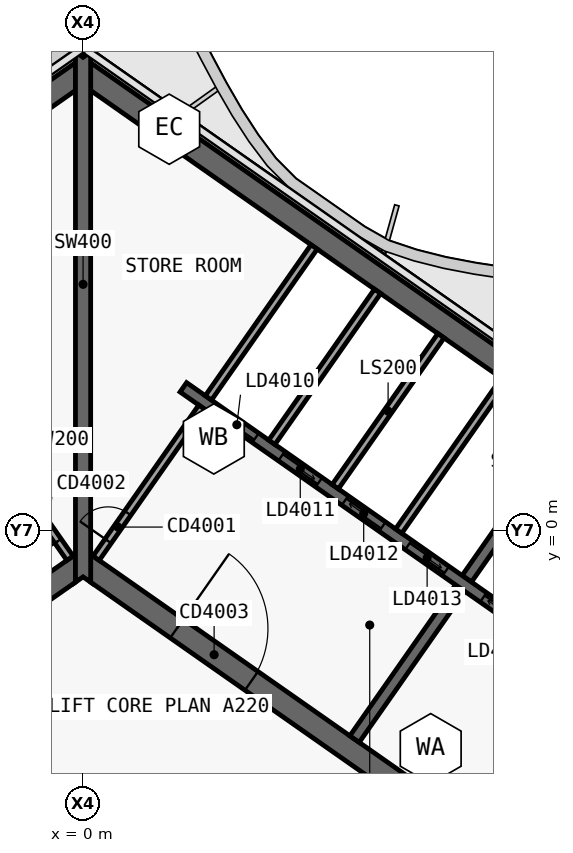
"""IFC4 building model, lengths in metres.
Left out: names, types, materials, properties, quantities, classifications, styles, units other than length and angle.
Written with IfcOpenShell. Run it as: python <this file> out.ifc"""

import sys

from ifc_helpers import new_model, si_unit, direction, frame, frame_2d, origin, place, context, subcontext, project, spatial, polyline, rectangle, outline, extrude, element, fill, save


model = new_model("IFC4")
c1 = context("Model", 3, precision=1e-05, world=origin(), true_north=direction((0.0, 1.0)))
c2 = subcontext(c1, "Body", "Model", "MODEL_VIEW")
j1 = project(units=[si_unit("LENGTHUNIT", "METRE"), si_unit("PLANEANGLEUNIT", "RADIAN")], contexts=[c1])
p1 = place(None, origin())
s1 = spatial("IfcSite", under=j1, at=p1, CompositionType="ELEMENT")
p2 = place(p1, origin())
s2 = spatial("IfcBuilding", under=s1, at=p2, CompositionType="ELEMENT")
p3 = place(p2, frame((0.0, 0.0, 219.4)))
s3 = spatial("IfcBuildingStorey", under=s2, at=p3, CompositionType="ELEMENT", Elevation=219.4)
p4 = place(p3, frame((-0.028, 12.066, 0.0), z_axis=(0.0, 0.0, 1.0), x_axis=(-0.819151382952, -0.573577380837, 0.0)))
e1 = element("IfcWall", 1, at=p4, inside=s3, PredefinedType="SHEAR", context=c2, shape_type="SweptSolid", body=[
    extrude(outline(polyline([(33.898, 0.3), (0.42, 0.3), (0.0, -0.3), (33.898, -0.3), (33.898, 0.3)])), origin(), (0.0, 0.0, 1.0), 6.0),
])
p5 = place(p3, frame((-0.028, -0.874, 0.0), z_axis=(0.0, 0.0, 1.0), x_axis=(-0.819150035022, -0.573579305871, 0.0)))
e2 = element("IfcWall", 2, at=p5, inside=s3, PredefinedType="SHEAR", context=c2, shape_type="SweptSolid", body=[
    extrude(outline(polyline([(26.476, 0.3), (0.42, 0.3), (0.0, -0.3), (26.476, -0.3), (26.476, 0.3)])), origin(), (0.0, 0.0, 1.0), 6.0),
])
p6 = place(p5, frame((2.976, 0.0, 0.0)))
e3 = element("IfcOpeningElement", 3, at=p6, cuts=e2, PredefinedType="OPENING", context=c2, shape_type="SweptSolid", body=[
    extrude(rectangle(XDim=2.4, YDim=2.1, at=frame_2d((1.2, 1.05))), frame((0.0, 0.31, 0.0), z_axis=(0.0, -1.0, 0.0), x_axis=(1.0, 0.0, 0.0)), (0.0, 0.0, 1.0), 0.62),
])
p7 = place(p5, frame((11.776, 0.0, 0.0)))
e4 = element("IfcOpeningElement", 4, at=p7, cuts=e2, PredefinedType="OPENING", context=c2, shape_type="SweptSolid", body=[
    extrude(rectangle(XDim=2.4, YDim=2.1, at=frame_2d((1.2, 1.05))), frame((0.0, 0.31, 0.0), z_axis=(0.0, -1.0, 0.0), x_axis=(1.0, 0.0, 0.0)), (0.0, 0.0, 1.0), 0.62),
])
p8 = place(p3, frame((0.028, 12.066, 0.0), z_axis=(0.0, 0.0, 1.0), x_axis=(0.819151382952, -0.573577380837, 0.0)))
e5 = element("IfcWall", 5, at=p8, inside=s3, PredefinedType="SHEAR", context=c2, shape_type="SweptSolid", body=[
    extrude(outline(polyline([(33.898, 0.3), (0.0, 0.3), (0.42, -0.3), (33.898, -0.3), (33.898, 0.3)])), origin(), (0.0, 0.0, 1.0), 6.0),
])
p9 = place(p3, frame((0.028, -0.874, 0.0), z_axis=(0.0, 0.0, 1.0), x_axis=(0.819150035022, -0.573579305871, 0.0)))
e6 = element("IfcWall", 6, at=p9, inside=s3, PredefinedType="SHEAR", context=c2, shape_type="SweptSolid", body=[
    extrude(outline(polyline([(26.476, 0.3), (0.0, 0.3), (0.42, -0.3), (26.476, -0.3), (26.476, 0.3)])), origin(), (0.0, 0.0, 1.0), 6.0),
])
p10 = place(p9, frame((2.976, 0.0, 0.0)))
e7 = element("IfcOpeningElement", 7, at=p10, cuts=e6, PredefinedType="OPENING", context=c2, shape_type="SweptSolid", body=[
    extrude(rectangle(XDim=2.4, YDim=2.1, at=frame_2d((1.2, 1.05))), frame((0.0, 0.31, 0.0), z_axis=(0.0, -1.0, 0.0), x_axis=(1.0, 0.0, 0.0)), (0.0, 0.0, 1.0), 0.62),
])
p11 = place(p9, frame((12.226, 0.0, 0.0)))
e8 = element("IfcOpeningElement", 8, at=p11, cuts=e6, PredefinedType="OPENING", context=c2, shape_type="SweptSolid", body=[
    extrude(rectangle(XDim=1.5, YDim=2.1, at=frame_2d((0.75, 1.05))), frame((0.0, 0.31, 0.0), z_axis=(0.0, -1.0, 0.0), x_axis=(1.0, 0.0, 0.0)), (0.0, 0.0, 1.0), 0.62),
])
p12 = place(p3, frame((7.143, -5.49, 0.0), z_axis=(0.0, 0.0, 1.0), x_axis=(0.573617744349, 0.819123118565, 0.0)))
e9 = element("IfcWall", 9, at=p12, inside=s3, PredefinedType="SHEAR", context=c2, shape_type="SweptSolid", body=[
    extrude(outline(polyline([(0.0, 0.15), (0.0, -0.15), (4.85, -0.15), (4.85, 0.15), (0.0, 0.15)])), origin(), (0.0, 0.0, 1.0), 6.0),
])
p13 = place(p3, frame((10.097, -1.271, 0.0), z_axis=(0.0, 0.0, 1.0), x_axis=(0.573560315113, 0.819163332265, 0.0)))
e10 = element("IfcWall", 10, at=p13, inside=s3, PredefinedType="SHEAR", context=c2, shape_type="SweptSolid", body=[
    extrude(outline(polyline([(4.85, -0.15), (4.85, 0.15), (0.0, 0.15), (0.0, -0.15), (4.85, -0.15)])), origin(), (0.0, 0.0, 1.0), 6.0),
])
p14 = place(p3, frame((2.638, 3.768, 0.0), z_axis=(0.0, 0.0, 1.0), x_axis=(0.819155014212, -0.573572194837, 0.0)))
e11 = element("IfcWall", 11, at=p14, inside=s3, PredefinedType="SHEAR", context=c2, shape_type="SweptSolid", body=[
    extrude(outline(polyline([(0.0, 0.15), (0.0, -0.15), (26.4, -0.15), (26.4, 0.15), (0.0, 0.15)])), origin(), (0.0, 0.0, 1.0), 6.0),
])
p15 = place(p14, frame((1.119, 0.0, 0.0)))
e12 = element("IfcOpeningElement", 12, at=p15, cuts=e11, PredefinedType="OPENING", context=c2, shape_type="SweptSolid", body=[
    extrude(rectangle(XDim=1.2, YDim=2.1, at=frame_2d((0.6, 1.05))), frame((0.0, 0.16, 0.0), z_axis=(0.0, -1.0, 0.0), x_axis=(1.0, 0.0, 0.0)), (0.0, 0.0, 1.0), 0.32),
])
p16 = place(p14, frame((3.156, 0.0, 0.0)))
e13 = element("IfcOpeningElement", 13, at=p16, cuts=e11, PredefinedType="OPENING", context=c2, shape_type="SweptSolid", body=[
    extrude(rectangle(XDim=1.2, YDim=2.1, at=frame_2d((0.6, 1.05))), frame((0.0, 0.16, 0.0), z_axis=(0.0, -1.0, 0.0), x_axis=(1.0, 0.0, 0.0)), (0.0, 0.0, 1.0), 0.32),
])
p17 = place(p14, frame((5.194, 0.0, 0.0)))
e14 = element("IfcOpeningElement", 14, at=p17, cuts=e11, PredefinedType="OPENING", context=c2, shape_type="SweptSolid", body=[
    extrude(rectangle(XDim=1.2, YDim=2.1, at=frame_2d((0.6, 1.05))), frame((0.0, 0.16, 0.0), z_axis=(0.0, -1.0, 0.0), x_axis=(1.0, 0.0, 0.0)), (0.0, 0.0, 1.0), 0.32),
])
p18 = place(p14, frame((7.231, 0.0, 0.0)))
e15 = element("IfcOpeningElement", 15, at=p18, cuts=e11, PredefinedType="OPENING", context=c2, shape_type="SweptSolid", body=[
    extrude(rectangle(XDim=1.2, YDim=2.1, at=frame_2d((0.6, 1.05))), frame((0.0, 0.16, 0.0), z_axis=(0.0, -1.0, 0.0), x_axis=(1.0, 0.0, 0.0)), (0.0, 0.0, 1.0), 0.32),
])
p19 = place(p14, frame((9.637, 0.0, 0.0)))
e16 = element("IfcOpeningElement", 16, at=p19, cuts=e11, PredefinedType="OPENING", context=c2, shape_type="SweptSolid", body=[
    extrude(rectangle(XDim=1.2, YDim=2.1, at=frame_2d((0.6, 1.05))), frame((0.0, 0.16, 0.0), z_axis=(0.0, -1.0, 0.0), x_axis=(1.0, 0.0, 0.0)), (0.0, 0.0, 1.0), 0.32),
])
p20 = place(p14, frame((11.812, 0.0, 0.0)))
e17 = element("IfcOpeningElement", 17, at=p20, cuts=e11, PredefinedType="OPENING", context=c2, shape_type="SweptSolid", body=[
    extrude(rectangle(XDim=1.2, YDim=2.1, at=frame_2d((0.6, 1.05))), frame((0.0, 0.16, 0.0), z_axis=(0.0, -1.0, 0.0), x_axis=(1.0, 0.0, 0.0)), (0.0, 0.0, 1.0), 0.32),
])
p21 = place(p14, frame((13.988, 0.0, 0.0)))
e18 = element("IfcOpeningElement", 18, at=p21, cuts=e11, PredefinedType="OPENING", context=c2, shape_type="SweptSolid", body=[
    extrude(rectangle(XDim=1.2, YDim=2.1, at=frame_2d((0.6, 1.05))), frame((0.0, 0.16, 0.0), z_axis=(0.0, -1.0, 0.0), x_axis=(1.0, 0.0, 0.0)), (0.0, 0.0, 1.0), 0.32),
])
p22 = place(p14, frame((16.262, 0.0, 0.0)))
e19 = element("IfcOpeningElement", 19, at=p22, cuts=e11, PredefinedType="OPENING", context=c2, shape_type="SweptSolid", body=[
    extrude(rectangle(XDim=1.0, YDim=2.1, at=frame_2d((0.5, 1.05))), frame((0.0, 0.16, 0.0), z_axis=(0.0, -1.0, 0.0), x_axis=(1.0, 0.0, 0.0)), (0.0, 0.0, 1.0), 0.32),
])
p23 = place(p3, frame((0.0, -1.361, 0.0), z_axis=(0.0, 0.0, 1.0), x_axis=(0.0, 1.0, 0.0)))
e20 = element("IfcWall", 20, at=p23, inside=s3, PredefinedType="SHEAR", context=c2, shape_type="SweptSolid", body=[
    extrude(outline(polyline([(0.14, 0.2), (0.0, 0.2), (0.14, 0.0), (0.0, -0.2), (0.14, -0.2), (1.012, -0.2), (12.94, -0.2), (13.813, -0.2), (13.893, -0.2), (13.933, -0.172), (13.813, 0.0), (13.933, 0.172), (13.893, 0.2), (13.813, 0.2), (12.94, 0.2), (1.012, 0.2), (0.14, 0.2)])), origin(), (0.0, 0.0, 1.0), 6.0),
])
p24 = place(p3, frame((4.967, 2.321, 0.0), z_axis=(0.0, 0.0, 1.0), x_axis=(0.573594092424, 0.81913968109, 0.0)))
e21 = element("IfcWall", 21, at=p24, inside=s3, PredefinedType="SOLIDWALL", context=c2, shape_type="SweptSolid", body=[
    extrude(rectangle(XDim=4.85, YDim=0.2, at=frame_2d((2.425, 0.0))), origin(), (0.0, 0.0, 1.0), 5.72),
])
p25 = place(p3, frame((6.636, 1.152, 0.0), z_axis=(0.0, 0.0, 1.0), x_axis=(0.573560315113, 0.819163332265, 0.0)))
e22 = element("IfcWall", 22, at=p25, inside=s3, PredefinedType="SOLIDWALL", context=c2, shape_type="SweptSolid", body=[
    extrude(rectangle(XDim=4.85, YDim=0.2, at=frame_2d((2.425, 0.0))), origin(), (0.0, 0.0, 1.0), 5.72),
])
p26 = place(p3, frame((8.305, -0.017, 0.0), z_axis=(0.0, 0.0, 1.0), x_axis=(0.573594092424, 0.81913968109, 0.0)))
e23 = element("IfcWall", 23, at=p26, inside=s3, PredefinedType="SOLIDWALL", context=c2, shape_type="SweptSolid", body=[
    extrude(rectangle(XDim=4.85, YDim=0.2, at=frame_2d((2.425, 0.0))), origin(), (0.0, 0.0, 1.0), 5.72),
])
p27 = place(p3, frame((-0.344, -0.729, 0.0), z_axis=(0.0, 0.0, 1.0), x_axis=(-0.573560315113, 0.819163332265, 0.0)))
e24 = element("IfcWall", 24, at=p27, inside=s3, PredefinedType="SOLIDWALL", context=c2, shape_type="SweptSolid", body=[
    extrude(rectangle(XDim=4.85, YDim=0.2, at=frame_2d((2.425, 0.0))), origin(), (0.0, 0.0, 1.0), 5.72),
])
p28 = place(p27, frame((0.55, 0.0, 0.0)))
e25 = element("IfcOpeningElement", 25, at=p28, cuts=e24, PredefinedType="OPENING", context=c2, shape_type="SweptSolid", body=[
    extrude(rectangle(XDim=0.9, YDim=2.1, at=frame_2d((0.45, 1.05))), frame((0.0, 0.11, 0.0), z_axis=(0.0, -1.0, 0.0), x_axis=(1.0, 0.0, 0.0)), (0.0, 0.0, 1.0), 0.22),
])
p29 = place(p3, frame((0.344, -0.729, 0.0), z_axis=(0.0, 0.0, 1.0), x_axis=(0.573560315113, 0.819163332265, 0.0)))
e26 = element("IfcWall", 26, at=p29, inside=s3, PredefinedType="SOLIDWALL", context=c2, shape_type="SweptSolid", body=[
    extrude(rectangle(XDim=4.85, YDim=0.2, at=frame_2d((2.425, 0.0))), origin(), (0.0, 0.0, 1.0), 5.72),
])
p30 = place(p29, frame((0.55, 0.0, 0.0)))
e27 = element("IfcOpeningElement", 27, at=p30, cuts=e26, PredefinedType="OPENING", context=c2, shape_type="SweptSolid", body=[
    extrude(rectangle(XDim=0.9, YDim=2.1, at=frame_2d((0.45, 1.05))), frame((0.0, 0.11, 0.0), z_axis=(0.0, -1.0, 0.0), x_axis=(1.0, 0.0, 0.0)), (0.0, 0.0, 1.0), 0.22),
])
p31 = place(p3, frame((3.298, 3.49, 0.0), z_axis=(0.0, 0.0, 1.0), x_axis=(0.573560315113, 0.819163332265, 0.0)))
e28 = element("IfcWall", 28, at=p31, inside=s3, PredefinedType="SOLIDWALL", context=c2, shape_type="SweptSolid", body=[
    extrude(rectangle(XDim=4.85, YDim=0.2, at=frame_2d((2.425, 0.0))), origin(), (0.0, 0.0, 1.0), 5.72),
])
p32 = place(p15, origin())
e29 = element("IfcDoor", 29, at=p32, inside=s3, OperationType="SLIDING_TO_LEFT", PredefinedType="DOOR", context=c2, shape_type="SweptSolid", body=[
    extrude(rectangle(XDim=1.2, YDim=2.1, at=frame_2d((0.6, 1.05))), frame((0.0, 0.025, 0.0), z_axis=(0.0, -1.0, 0.0), x_axis=(1.0, 0.0, 0.0)), (0.0, 0.0, 1.0), 0.05),
])
fill(e12, e29)
p33 = place(p16, origin())
e30 = element("IfcDoor", 30, at=p33, inside=s3, OperationType="SLIDING_TO_RIGHT", PredefinedType="DOOR", context=c2, shape_type="SweptSolid", body=[
    extrude(rectangle(XDim=1.2, YDim=2.1, at=frame_2d((0.6, 1.05))), frame((0.0, 0.025, 0.0), z_axis=(0.0, -1.0, 0.0), x_axis=(1.0, 0.0, 0.0)), (0.0, 0.0, 1.0), 0.05),
])
fill(e13, e30)
p34 = place(p17, origin())
e31 = element("IfcDoor", 31, at=p34, inside=s3, OperationType="SLIDING_TO_LEFT", PredefinedType="DOOR", context=c2, shape_type="SweptSolid", body=[
    extrude(rectangle(XDim=1.2, YDim=2.1, at=frame_2d((0.6, 1.05))), frame((0.0, 0.025, 0.0), z_axis=(0.0, -1.0, 0.0), x_axis=(1.0, 0.0, 0.0)), (0.0, 0.0, 1.0), 0.05),
])
fill(e14, e31)
p35 = place(p18, origin())
e32 = element("IfcDoor", 32, at=p35, inside=s3, OperationType="SLIDING_TO_RIGHT", PredefinedType="DOOR", context=c2, shape_type="SweptSolid", body=[
    extrude(rectangle(XDim=1.2, YDim=2.1, at=frame_2d((0.6, 1.05))), frame((0.0, 0.025, 0.0), z_axis=(0.0, -1.0, 0.0), x_axis=(1.0, 0.0, 0.0)), (0.0, 0.0, 1.0), 0.05),
])
fill(e15, e32)
p36 = place(p19, origin())
e33 = element("IfcDoor", 33, at=p36, inside=s3, OperationType="SLIDING_TO_LEFT", PredefinedType="DOOR", context=c2, shape_type="SweptSolid", body=[
    extrude(rectangle(XDim=1.2, YDim=2.1, at=frame_2d((0.6, 1.05))), frame((0.0, 0.025, 0.0), z_axis=(0.0, -1.0, 0.0), x_axis=(1.0, 0.0, 0.0)), (0.0, 0.0, 1.0), 0.05),
])
fill(e16, e33)
p37 = place(p10, origin())
e34 = element("IfcDoor", 34, at=p37, inside=s3, OperationType="DOUBLE_DOOR_SINGLE_SWING", PredefinedType="DOOR", context=c2, shape_type="SweptSolid", body=[
    extrude(rectangle(XDim=2.4, YDim=2.1, at=frame_2d((1.2, 1.05))), frame((0.0, 0.025, 0.0), z_axis=(0.0, -1.0, 0.0), x_axis=(1.0, 0.0, 0.0)), (0.0, 0.0, 1.0), 0.05),
])
fill(e7, e34)
p38 = place(p28, origin())
e35 = element("IfcDoor", 35, at=p38, inside=s3, OperationType="SINGLE_SWING_RIGHT", PredefinedType="DOOR", context=c2, shape_type="SweptSolid", body=[
    extrude(rectangle(XDim=0.9, YDim=2.1, at=frame_2d((0.45, 1.05))), frame((0.0, 0.025, 0.0), z_axis=(0.0, -1.0, 0.0), x_axis=(1.0, 0.0, 0.0)), (0.0, 0.0, 1.0), 0.05),
])
fill(e25, e35)
p39 = place(p30, origin())
e36 = element("IfcDoor", 36, at=p39, inside=s3, OperationType="SINGLE_SWING_RIGHT", PredefinedType="DOOR", context=c2, shape_type="SweptSolid", body=[
    extrude(rectangle(XDim=0.9, YDim=2.1, at=frame_2d((0.45, 1.05))), frame((0.0, 0.025, 0.0), z_axis=(0.0, -1.0, 0.0), x_axis=(1.0, 0.0, 0.0)), (0.0, 0.0, 1.0), 0.05),
])
fill(e27, e36)
save(model, sys.argv[1])
